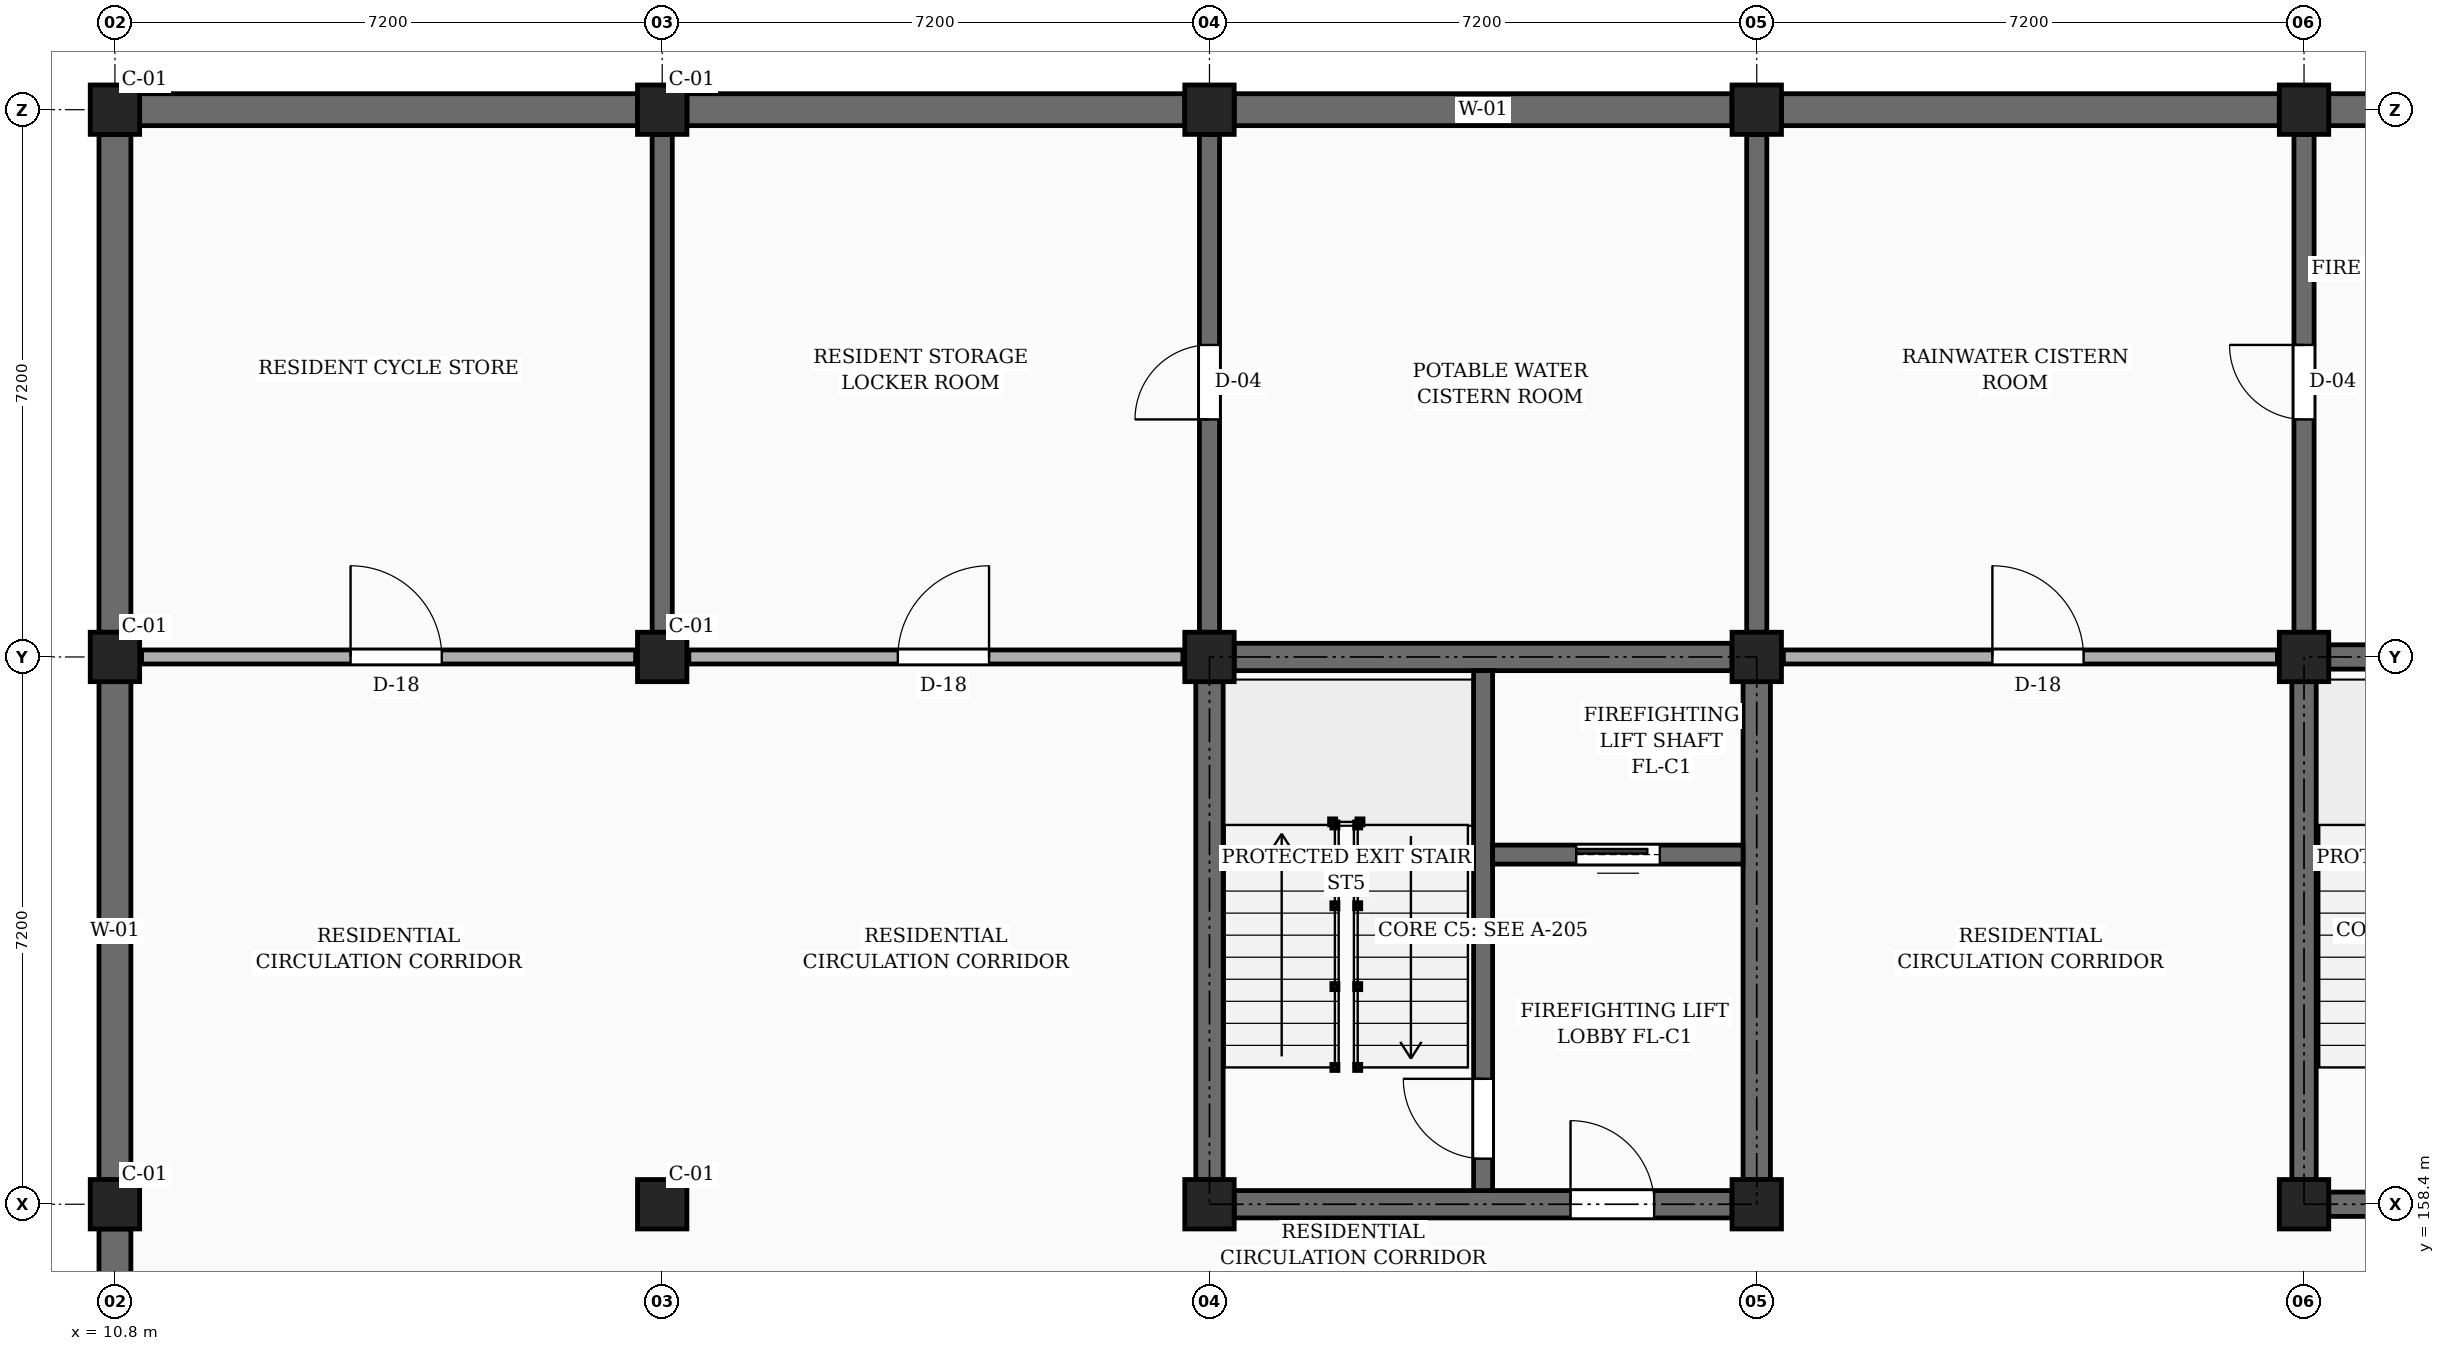
"""IFC4 building model, lengths in metres.
Left out: names, types, materials, properties, quantities, classifications, styles, units other than length and angle.
Written with IfcOpenShell. Run it as: python <this file> out.ifc"""

import sys

from ifc_helpers import new_model, si_unit, direction, frame, frame_2d, origin, origin_2d, place, context, subcontext, project, spatial, rectangle, extrude, element, fill, save


model = new_model("IFC4")
c1 = context("Model", 3, precision=1e-05, world=origin(), true_north=direction((0.0, 1.0)))
c2 = subcontext(c1, "Body", "Model", "MODEL_VIEW")
j1 = project(units=[si_unit("LENGTHUNIT", "METRE"), si_unit("PLANEANGLEUNIT", "RADIAN")], contexts=[c1])
p1 = place(None, origin())
s1 = spatial("IfcSite", under=j1, at=p1, CompositionType="ELEMENT")
p2 = place(p1, origin())
s2 = spatial("IfcBuilding", under=s1, at=p2, CompositionType="ELEMENT")
p3 = place(p2, frame((0.0, 0.0, -4.2)))
s3 = spatial("IfcBuildingStorey", under=s2, at=p3, CompositionType="ELEMENT", Elevation=-4.2)
for number, where, z_axis, x_axis in (
    (1, (10.8, 158.4, 0.0), (0.0, 0.0, 1.0), (1.0, 0.0, 0.0)),
    (2, (10.8, 165.6, 0.0), (0.0, 0.0, 1.0), (1.0, 0.0, 0.0)),
    (3, (10.8, 172.8, 0.0), (0.0, 0.0, 1.0), (1.0, 0.0, 0.0)),
    (4, (18.0, 158.4, 0.0), (0.0, 0.0, 1.0), (1.0, 0.0, 0.0)),
    (5, (18.0, 165.6, 0.0), (0.0, 0.0, 1.0), (1.0, 0.0, 0.0)),
    (6, (18.0, 172.8, 0.0), (0.0, 0.0, 1.0), (1.0, 0.0, 0.0)),
    (7, (25.2, 158.4, 0.0), (0.0, 0.0, 1.0), (1.0, 0.0, 0.0)),
    (8, (25.2, 165.6, 0.0), (0.0, 0.0, 1.0), (1.0, 0.0, 0.0)),
    (9, (25.2, 172.8, 0.0), (0.0, 0.0, 1.0), (1.0, 0.0, 0.0)),
    (10, (32.4, 158.4, 0.0), (0.0, 0.0, 1.0), (1.0, 0.0, 0.0)),
    (11, (32.4, 165.6, 0.0), (0.0, 0.0, 1.0), (1.0, 0.0, 0.0)),
    (12, (32.4, 172.8, 0.0), (0.0, 0.0, 1.0), (1.0, 0.0, 0.0)),
    (13, (39.6, 158.4, 0.0), (0.0, 0.0, 1.0), (1.0, 0.0, 0.0)),
    (14, (39.6, 165.6, 0.0), (0.0, 0.0, 1.0), (1.0, 0.0, 0.0)),
    (15, (39.6, 172.8, 0.0), (0.0, 0.0, 1.0), (1.0, 0.0, 0.0)),
):
    element("IfcColumn", number, at=place(p3, frame(where, z_axis=z_axis, x_axis=x_axis)), inside=s3, PredefinedType="COLUMN", context=c2, shape_type="SweptSolid", body=[
        extrude(rectangle(XDim=0.65, YDim=0.65, at=origin_2d()), origin(), (0.0, 0.0, 1.0), 4.2),
    ])
for number, where, z_axis, x_axis in (
    (16, (17.675, 172.8, 0.0), (0.0, 0.0, 1.0), (-1.0, 0.0, 0.0)),
    (17, (24.875, 172.8, 0.0), (0.0, 0.0, 1.0), (-1.0, 0.0, 0.0)),
    (18, (32.075, 172.8, 0.0), (0.0, 0.0, 1.0), (-1.0, 0.0, 0.0)),
):
    element("IfcWall", number, at=place(p3, frame(where, z_axis=z_axis, x_axis=x_axis)), inside=s3, PredefinedType="USERDEFINED", context=c2, shape_type="SweptSolid", body=[
        extrude(rectangle(XDim=6.55, YDim=0.42, at=frame_2d((3.275, 0.0))), origin(), (0.0, 0.0, 1.0), 3.03),
    ])
p4 = place(p3, frame((39.275, 172.8, 0.0), z_axis=(0.0, 0.0, 1.0), x_axis=(-1.0, 0.0, 0.0)))
e19 = element("IfcWall", 19, at=p4, inside=s3, PredefinedType="USERDEFINED", context=c2, shape_type="SweptSolid", body=[
    extrude(rectangle(XDim=6.55, YDim=0.42, at=frame_2d((3.275, 0.0))), origin(), (0.0, 0.0, 1.0), 3.03),
])
for number, where, z_axis, x_axis in (
    (20, (46.475, 172.8, 0.0), (0.0, 0.0, 1.0), (-1.0, 0.0, 0.0)),
    (21, (10.8, 158.075, 0.0), (0.0, 0.0, 1.0), (0.0, -1.0, 0.0)),
):
    element("IfcWall", number, at=place(p3, frame(where, z_axis=z_axis, x_axis=x_axis)), inside=s3, PredefinedType="USERDEFINED", context=c2, shape_type="SweptSolid", body=[
        extrude(rectangle(XDim=6.55, YDim=0.42, at=frame_2d((3.275, 0.0))), origin(), (0.0, 0.0, 1.0), 3.03),
    ])
p5 = place(p3, frame((10.8, 165.275, 0.0), z_axis=(0.0, 0.0, 1.0), x_axis=(0.0, -1.0, 0.0)))
e22 = element("IfcWall", 22, at=p5, inside=s3, PredefinedType="USERDEFINED", context=c2, shape_type="SweptSolid", body=[
    extrude(rectangle(XDim=6.55, YDim=0.42, at=frame_2d((3.275, 0.0))), origin(), (0.0, 0.0, 1.0), 3.03),
])
p6 = place(p3, frame((10.8, 172.475, 0.0), z_axis=(0.0, 0.0, 1.0), x_axis=(0.0, -1.0, 0.0)))
e23 = element("IfcWall", 23, at=p6, inside=s3, PredefinedType="USERDEFINED", context=c2, shape_type="SweptSolid", body=[
    extrude(rectangle(XDim=6.55, YDim=0.42, at=frame_2d((3.275, 0.0))), origin(), (0.0, 0.0, 1.0), 3.03),
])
p7 = place(p3, frame((18.0, 165.925, 0.0), z_axis=(0.0, 0.0, 1.0), x_axis=(0.0, 1.0, 0.0)))
e24 = element("IfcWall", 24, at=p7, inside=s3, PredefinedType="SOLIDWALL", context=c2, shape_type="SweptSolid", body=[
    extrude(rectangle(XDim=6.55, YDim=0.265, at=frame_2d((3.275, 0.0))), origin(), (0.0, 0.0, 1.0), 3.18),
])
p8 = place(p3, frame((25.2, 165.925, 0.0), z_axis=(0.0, 0.0, 1.0), x_axis=(0.0, 1.0, 0.0)))
e25 = element("IfcWall", 25, at=p8, inside=s3, PredefinedType="SOLIDWALL", context=c2, shape_type="SweptSolid", body=[
    extrude(rectangle(XDim=6.55, YDim=0.265, at=frame_2d((3.275, 0.0))), origin(), (0.0, 0.0, 1.0), 3.18),
])
p9 = place(p8, frame((2.8, 0.0, 0.0)))
e26 = element("IfcOpeningElement", 26, at=p9, cuts=e25, PredefinedType="OPENING", context=c2, shape_type="SweptSolid", body=[
    extrude(rectangle(XDim=0.98, YDim=2.12, at=frame_2d((0.49, 1.06))), frame((0.0, 0.143, 0.0), z_axis=(0.0, -1.0, 0.0), x_axis=(1.0, 0.0, 0.0)), (0.0, 0.0, 1.0), 0.285),
])
p10 = place(p3, frame((32.4, 165.925, 0.0), z_axis=(0.0, 0.0, 1.0), x_axis=(0.0, 1.0, 0.0)))
e27 = element("IfcWall", 27, at=p10, inside=s3, PredefinedType="SOLIDWALL", context=c2, shape_type="SweptSolid", body=[
    extrude(rectangle(XDim=6.55, YDim=0.265, at=frame_2d((3.275, 0.0))), origin(), (0.0, 0.0, 1.0), 3.18),
])
p11 = place(p3, frame((39.6, 165.925, 0.0), z_axis=(0.0, 0.0, 1.0), x_axis=(0.0, 1.0, 0.0)))
e28 = element("IfcWall", 28, at=p11, inside=s3, PredefinedType="SOLIDWALL", context=c2, shape_type="SweptSolid", body=[
    extrude(rectangle(XDim=6.55, YDim=0.265, at=frame_2d((3.275, 0.0))), origin(), (0.0, 0.0, 1.0), 3.18),
])
p12 = place(p11, frame((2.8, 0.0, 0.0)))
e29 = element("IfcOpeningElement", 29, at=p12, cuts=e28, PredefinedType="OPENING", context=c2, shape_type="SweptSolid", body=[
    extrude(rectangle(XDim=0.98, YDim=2.12, at=frame_2d((0.49, 1.06))), frame((0.0, 0.143, 0.0), z_axis=(0.0, -1.0, 0.0), x_axis=(1.0, 0.0, 0.0)), (0.0, 0.0, 1.0), 0.285),
])
p13 = place(p3, frame((25.2, 158.725, 0.0), z_axis=(0.0, 0.0, 1.0), x_axis=(0.0, 1.0, 0.0)))
e30 = element("IfcWall", 30, at=p13, inside=s3, PredefinedType="SHEAR", context=c2, shape_type="SweptSolid", body=[
    extrude(rectangle(XDim=6.55, YDim=0.36, at=frame_2d((3.275, 0.0))), origin(), (0.0, 0.0, 1.0), 3.88),
])
p14 = place(p3, frame((25.525, 165.6, 0.0), z_axis=(0.0, 0.0, 1.0), x_axis=(1.0, 0.0, 0.0)))
e31 = element("IfcWall", 31, at=p14, inside=s3, PredefinedType="SHEAR", context=c2, shape_type="SweptSolid", body=[
    extrude(rectangle(XDim=6.55, YDim=0.36, at=frame_2d((3.275, 0.0))), origin(), (0.0, 0.0, 1.0), 3.88),
])
p15 = place(p3, frame((32.4, 158.725, 0.0), z_axis=(0.0, 0.0, 1.0), x_axis=(0.0, 1.0, 0.0)))
e32 = element("IfcWall", 32, at=p15, inside=s3, PredefinedType="SHEAR", context=c2, shape_type="SweptSolid", body=[
    extrude(rectangle(XDim=6.55, YDim=0.36, at=frame_2d((3.275, 0.0))), origin(), (0.0, 0.0, 1.0), 3.88),
])
p16 = place(p3, frame((25.525, 158.4, 0.0), z_axis=(0.0, 0.0, 1.0), x_axis=(1.0, 0.0, 0.0)))
e33 = element("IfcWall", 33, at=p16, inside=s3, PredefinedType="SHEAR", context=c2, shape_type="SweptSolid", body=[
    extrude(rectangle(XDim=6.55, YDim=0.36, at=frame_2d((3.275, 0.0))), origin(), (0.0, 0.0, 1.0), 3.88),
])
p17 = place(p16, frame((4.425, 0.0, 0.0)))
e34 = element("IfcOpeningElement", 34, at=p17, cuts=e33, PredefinedType="OPENING", context=c2, shape_type="SweptSolid", body=[
    extrude(rectangle(XDim=1.1, YDim=2.15, at=frame_2d((0.55, 1.075))), frame((0.0, 0.19, 0.0), z_axis=(0.0, -1.0, 0.0), x_axis=(1.0, 0.0, 0.0)), (0.0, 0.0, 1.0), 0.38),
])
p18 = place(p3, frame((28.8, 158.58, 0.0), z_axis=(0.0, 0.0, 1.0), x_axis=(0.0, 1.0, 0.0)))
e35 = element("IfcWall", 35, at=p18, inside=s3, PredefinedType="SHEAR", context=c2, shape_type="SweptSolid", body=[
    extrude(rectangle(XDim=6.84, YDim=0.25, at=frame_2d((3.42, 0.0))), origin(), (0.0, 0.0, 1.0), 3.88),
])
p19 = place(p18, frame((0.42, 0.0, 0.0)))
e36 = element("IfcOpeningElement", 36, at=p19, cuts=e35, PredefinedType="OPENING", context=c2, shape_type="SweptSolid", body=[
    extrude(rectangle(XDim=1.05, YDim=2.15, at=frame_2d((0.525, 1.075))), frame((0.0, 0.135, 0.0), z_axis=(0.0, -1.0, 0.0), x_axis=(1.0, 0.0, 0.0)), (0.0, 0.0, 1.0), 0.27),
])
p20 = place(p3, frame((28.925, 163.0, 0.0), z_axis=(0.0, 0.0, 1.0), x_axis=(1.0, 0.0, 0.0)))
e37 = element("IfcWall", 37, at=p20, inside=s3, PredefinedType="SHEAR", context=c2, shape_type="SweptSolid", body=[
    extrude(rectangle(XDim=3.295, YDim=0.25, at=frame_2d((1.647, 0.0))), origin(), (0.0, 0.0, 1.0), 3.88),
])
p21 = place(p20, frame((1.1, 0.0, 0.0)))
e38 = element("IfcOpeningElement", 38, at=p21, cuts=e37, PredefinedType="OPENING", context=c2, shape_type="SweptSolid", body=[
    extrude(rectangle(XDim=1.1, YDim=2.2, at=frame_2d((0.55, 1.1))), frame((0.0, 0.135, 0.0), z_axis=(0.0, -1.0, 0.0), x_axis=(1.0, 0.0, 0.0)), (0.0, 0.0, 1.0), 0.27),
])
p22 = place(p3, frame((39.6, 158.725, 0.0), z_axis=(0.0, 0.0, 1.0), x_axis=(0.0, 1.0, 0.0)))
e39 = element("IfcWall", 39, at=p22, inside=s3, PredefinedType="SHEAR", context=c2, shape_type="SweptSolid", body=[
    extrude(rectangle(XDim=6.55, YDim=0.32, at=frame_2d((3.275, 0.0))), origin(), (0.0, 0.0, 1.0), 3.88),
])
p23 = place(p3, frame((39.925, 165.6, 0.0), z_axis=(0.0, 0.0, 1.0), x_axis=(1.0, 0.0, 0.0)))
e40 = element("IfcWall", 40, at=p23, inside=s3, PredefinedType="SHEAR", context=c2, shape_type="SweptSolid", body=[
    extrude(rectangle(XDim=6.55, YDim=0.32, at=frame_2d((3.275, 0.0))), origin(), (0.0, 0.0, 1.0), 3.88),
])
p24 = place(p3, frame((39.925, 158.4, 0.0), z_axis=(0.0, 0.0, 1.0), x_axis=(1.0, 0.0, 0.0)))
e41 = element("IfcWall", 41, at=p24, inside=s3, PredefinedType="SHEAR", context=c2, shape_type="SweptSolid", body=[
    extrude(rectangle(XDim=6.55, YDim=0.32, at=frame_2d((3.275, 0.0))), origin(), (0.0, 0.0, 1.0), 3.88),
])
p25 = place(p24, frame((4.425, 0.0, 0.0)))
e42 = element("IfcOpeningElement", 42, at=p25, cuts=e41, PredefinedType="OPENING", context=c2, shape_type="SweptSolid", body=[
    extrude(rectangle(XDim=1.1, YDim=2.15, at=frame_2d((0.55, 1.075))), frame((0.0, 0.17, 0.0), z_axis=(0.0, -1.0, 0.0), x_axis=(1.0, 0.0, 0.0)), (0.0, 0.0, 1.0), 0.34),
])
p26 = place(p3, frame((11.15, 165.6, 0.0), z_axis=(0.0, 0.0, 1.0), x_axis=(1.0, 0.0, 0.0)))
e43 = element("IfcWall", 43, at=p26, inside=s3, PredefinedType="PARTITIONING", context=c2, shape_type="SweptSolid", body=[
    extrude(rectangle(XDim=6.5, YDim=0.185, at=frame_2d((3.25, 0.0))), origin(), (0.0, 0.0, 1.0), 3.03),
])
p27 = place(p26, frame((2.75, 0.0, 0.0)))
e44 = element("IfcOpeningElement", 44, at=p27, cuts=e43, PredefinedType="OPENING", context=c2, shape_type="SweptSolid", body=[
    extrude(rectangle(XDim=1.2, YDim=2.2, at=frame_2d((0.6, 1.1))), frame((0.0, 0.103, 0.0), z_axis=(0.0, -1.0, 0.0), x_axis=(1.0, 0.0, 0.0)), (0.0, 0.0, 1.0), 0.205),
])
p28 = place(p3, frame((18.35, 165.6, 0.0), z_axis=(0.0, 0.0, 1.0), x_axis=(1.0, 0.0, 0.0)))
e45 = element("IfcWall", 45, at=p28, inside=s3, PredefinedType="PARTITIONING", context=c2, shape_type="SweptSolid", body=[
    extrude(rectangle(XDim=6.5, YDim=0.185, at=frame_2d((3.25, 0.0))), origin(), (0.0, 0.0, 1.0), 3.03),
])
p29 = place(p28, frame((2.75, 0.0, 0.0)))
e46 = element("IfcOpeningElement", 46, at=p29, cuts=e45, PredefinedType="OPENING", context=c2, shape_type="SweptSolid", body=[
    extrude(rectangle(XDim=1.2, YDim=2.2, at=frame_2d((0.6, 1.1))), frame((0.0, 0.103, 0.0), z_axis=(0.0, -1.0, 0.0), x_axis=(1.0, 0.0, 0.0)), (0.0, 0.0, 1.0), 0.205),
])
p30 = place(p3, frame((32.75, 165.6, 0.0), z_axis=(0.0, 0.0, 1.0), x_axis=(1.0, 0.0, 0.0)))
e47 = element("IfcWall", 47, at=p30, inside=s3, PredefinedType="PARTITIONING", context=c2, shape_type="SweptSolid", body=[
    extrude(rectangle(XDim=6.5, YDim=0.185, at=frame_2d((3.25, 0.0))), origin(), (0.0, 0.0, 1.0), 3.03),
])
p31 = place(p30, frame((2.75, 0.0, 0.0)))
e48 = element("IfcOpeningElement", 48, at=p31, cuts=e47, PredefinedType="OPENING", context=c2, shape_type="SweptSolid", body=[
    extrude(rectangle(XDim=1.2, YDim=2.2, at=frame_2d((0.6, 1.1))), frame((0.0, 0.103, 0.0), z_axis=(0.0, -1.0, 0.0), x_axis=(1.0, 0.0, 0.0)), (0.0, 0.0, 1.0), 0.205),
])
p32 = place(p17, frame((1.1, 0.0, 0.0), z_axis=(0.0, 0.0, 1.0), x_axis=(-1.0, 0.0, 0.0)))
e49 = element("IfcDoor", 49, at=p32, inside=s3, OperationType="SINGLE_SWING_LEFT", PredefinedType="DOOR", context=c2, shape_type="SweptSolid", body=[
    extrude(rectangle(XDim=1.1, YDim=2.15, at=frame_2d((0.55, 1.075))), frame((0.0, 0.025, 0.0), z_axis=(0.0, -1.0, 0.0), x_axis=(1.0, 0.0, 0.0)), (0.0, 0.0, 1.0), 0.05),
])
fill(e34, e49)
p33 = place(p19, origin())
e50 = element("IfcDoor", 50, at=p33, inside=s3, OperationType="SINGLE_SWING_RIGHT", PredefinedType="DOOR", context=c2, shape_type="SweptSolid", body=[
    extrude(rectangle(XDim=1.05, YDim=2.15, at=frame_2d((0.525, 1.075))), frame((0.0, 0.025, 0.0), z_axis=(0.0, -1.0, 0.0), x_axis=(1.0, 0.0, 0.0)), (0.0, 0.0, 1.0), 0.05),
])
fill(e36, e50)
p34 = place(p21, origin())
e51 = element("IfcDoor", 51, at=p34, inside=s3, OperationType="SLIDING_TO_LEFT", PredefinedType="DOOR", context=c2, shape_type="SweptSolid", body=[
    extrude(rectangle(XDim=1.1, YDim=2.2, at=frame_2d((0.55, 1.1))), frame((0.0, 0.025, 0.0), z_axis=(0.0, -1.0, 0.0), x_axis=(1.0, 0.0, 0.0)), (0.0, 0.0, 1.0), 0.05),
])
fill(e38, e51)
p35 = place(p27, origin())
e52 = element("IfcDoor", 52, at=p35, inside=s3, OperationType="SINGLE_SWING_LEFT", PredefinedType="DOOR", context=c2, shape_type="SweptSolid", body=[
    extrude(rectangle(XDim=1.2, YDim=2.2, at=frame_2d((0.6, 1.1))), frame((0.0, 0.025, 0.0), z_axis=(0.0, -1.0, 0.0), x_axis=(1.0, 0.0, 0.0)), (0.0, 0.0, 1.0), 0.05),
])
fill(e44, e52)
p36 = place(p29, origin())
e53 = element("IfcDoor", 53, at=p36, inside=s3, OperationType="SINGLE_SWING_RIGHT", PredefinedType="DOOR", context=c2, shape_type="SweptSolid", body=[
    extrude(rectangle(XDim=1.2, YDim=2.2, at=frame_2d((0.6, 1.1))), frame((0.0, 0.025, 0.0), z_axis=(0.0, -1.0, 0.0), x_axis=(1.0, 0.0, 0.0)), (0.0, 0.0, 1.0), 0.05),
])
fill(e46, e53)
p37 = place(p31, origin())
e54 = element("IfcDoor", 54, at=p37, inside=s3, OperationType="SINGLE_SWING_LEFT", PredefinedType="DOOR", context=c2, shape_type="SweptSolid", body=[
    extrude(rectangle(XDim=1.2, YDim=2.2, at=frame_2d((0.6, 1.1))), frame((0.0, 0.025, 0.0), z_axis=(0.0, -1.0, 0.0), x_axis=(1.0, 0.0, 0.0)), (0.0, 0.0, 1.0), 0.05),
])
fill(e48, e54)
p38 = place(p9, origin())
e55 = element("IfcDoor", 55, at=p38, inside=s3, OperationType="SINGLE_SWING_LEFT", PredefinedType="DOOR", context=c2, shape_type="SweptSolid", body=[
    extrude(rectangle(XDim=0.98, YDim=2.12, at=frame_2d((0.49, 1.06))), frame((0.0, 0.025, 0.0), z_axis=(0.0, -1.0, 0.0), x_axis=(1.0, 0.0, 0.0)), (0.0, 0.0, 1.0), 0.05),
])
fill(e26, e55)
p39 = place(p12, origin())
e56 = element("IfcDoor", 56, at=p39, inside=s3, OperationType="SINGLE_SWING_RIGHT", PredefinedType="DOOR", context=c2, shape_type="SweptSolid", body=[
    extrude(rectangle(XDim=0.98, YDim=2.12, at=frame_2d((0.49, 1.06))), frame((0.0, 0.025, 0.0), z_axis=(0.0, -1.0, 0.0), x_axis=(1.0, 0.0, 0.0)), (0.0, 0.0, 1.0), 0.05),
])
fill(e29, e56)
save(model, sys.argv[1])
